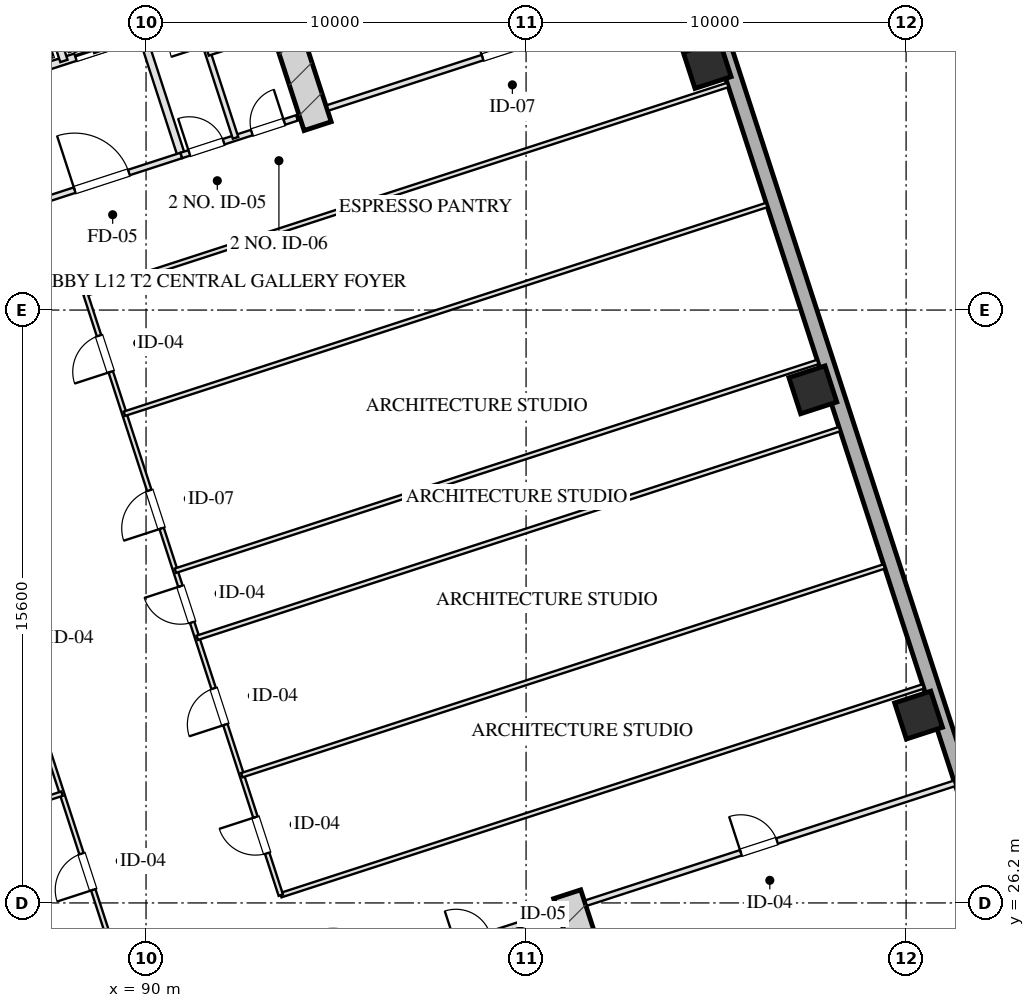
"""IFC4 building model, lengths in metres.
Left out: names, types, materials, properties, quantities, classifications, styles, units other than length and angle.
Written with IfcOpenShell. Run it as: python <this file> out.ifc"""

import sys

from ifc_helpers import new_model, si_unit, direction, frame, frame_2d, origin, origin_2d, place, context, subcontext, project, spatial, rectangle, hollow_rectangle, extrude, element, fill, save


model = new_model("IFC4")
c1 = context("Model", 3, precision=1e-05, world=origin(), true_north=direction((0.0, 1.0)))
c2 = subcontext(c1, "Body", "Model", "MODEL_VIEW")
j1 = project(units=[si_unit("LENGTHUNIT", "METRE"), si_unit("PLANEANGLEUNIT", "RADIAN")], contexts=[c1])
p1 = place(None, origin())
s1 = spatial("IfcSite", under=j1, at=p1, CompositionType="ELEMENT")
p2 = place(p1, origin())
s2 = spatial("IfcBuilding", under=s1, at=p2, CompositionType="ELEMENT")
p3 = place(p2, frame((0.0, 0.0, 54.05)))
s3 = spatial("IfcBuildingStorey", under=s2, at=p3, CompositionType="ELEMENT", Elevation=54.05)
for number, where, z_axis, x_axis in (
    (1, (101.082, 26.429, 0.0), (0.0, 0.0, 1.0), (0.309, -0.951, 0.0)),
    (2, (94.515, 46.639, 0.0), (0.0, 0.0, 1.0), (-0.309, 0.951, 0.0)),
):
    element("IfcWall", number, at=place(p3, frame(where, z_axis=z_axis, x_axis=x_axis)), inside=s3, PredefinedType="SHEAR", context=c2, shape_type="SweptSolid", body=[
        extrude(rectangle(XDim=9.63, YDim=0.75, at=frame_2d((4.815, 0.0))), origin(), (0.0, 0.0, 1.0), 3.45),
    ])
for number, where, z_axis, x_axis in (
    (3, (110.328, 31.142, 0.0), (0.0, 0.0, 1.0), (0.951, 0.309, 0.0)),
    (4, (107.547, 39.701, 0.0), (0.0, 0.0, 1.0), (0.951, 0.309, 0.0)),
    (5, (104.766, 48.261, 0.0), (0.0, 0.0, 1.0), (0.951, 0.309, 0.0)),
):
    element("IfcColumn", number, at=place(p3, frame(where, z_axis=z_axis, x_axis=x_axis)), inside=s3, PredefinedType="COLUMN", context=c2, shape_type="SweptSolid", body=[
        extrude(hollow_rectangle(XDim=1.0, YDim=1.0, WallThickness=0.036, at=origin_2d()), origin(), (0.0, 0.0, 1.0), 3.451),
    ])
p4 = place(p3, frame((100.345, 63.648, 0.0), z_axis=(0.0, 0.0, 1.0), x_axis=(0.309014526607, -0.951057318118, 0.0)))
e6 = element("IfcWall", 6, at=p4, inside=s3, PredefinedType="SOLIDWALL", context=c2, shape_type="SweptSolid", body=[
    extrude(rectangle(XDim=50.0, YDim=0.4, at=frame_2d((25.0, 0.0))), origin(), (0.0, 0.0, 1.0), 2.61),
])
p5 = place(p3, frame((97.727, 24.944, 0.0), z_axis=(0.0, 0.0, 1.0), x_axis=(0.951036872128, 0.309077446369, 0.0)))
e7 = element("IfcWall", 7, at=p5, inside=s3, PredefinedType="PARTITIONING", context=c2, shape_type="SweptSolid", body=[
    extrude(rectangle(XDim=3.2, YDim=0.15, at=frame_2d((1.6, 0.0))), origin(), (0.0, 0.0, 1.0), 3.175),
])
p6 = place(p5, frame((0.45, 0.0, 0.0)))
e8 = element("IfcOpeningElement", 8, at=p6, cuts=e7, PredefinedType="OPENING", context=c2, shape_type="SweptSolid", body=[
    extrude(rectangle(XDim=0.95, YDim=2.05, at=frame_2d((0.475, 1.025))), frame((0.0, 0.085, 0.0), z_axis=(0.0, -1.0, 0.0), x_axis=(1.0, 0.0, 0.0)), (0.0, 0.0, 1.0), 0.17),
])
p7 = place(p3, frame((90.928, 45.868, 0.0), z_axis=(0.0, 0.0, 1.0), x_axis=(-0.309042196757, 0.951048327176, 0.0)))
e9 = element("IfcWall", 9, at=p7, inside=s3, PredefinedType="PARTITIONING", context=c2, shape_type="SweptSolid", body=[
    extrude(rectangle(XDim=8.43, YDim=0.2, at=frame_2d((4.215, 0.0))), origin(), (0.0, 0.0, 1.0), 3.175),
])
p8 = place(p3, frame((86.743, 44.508, 0.0), z_axis=(0.0, 0.0, 1.0), x_axis=(0.951063829732, 0.308994485023, 0.0)))
e10 = element("IfcWall", 10, at=p8, inside=s3, PredefinedType="PARTITIONING", context=c2, shape_type="SweptSolid", body=[
    extrude(rectangle(XDim=4.4, YDim=0.15, at=frame_2d((2.2, 0.0))), origin(), (0.0, 0.0, 1.0), 3.175),
])
p9 = place(p8, frame((1.45, 0.0, 0.0)))
e11 = element("IfcOpeningElement", 11, at=p9, cuts=e10, PredefinedType="OPENING", context=c2, shape_type="SweptSolid", body=[
    extrude(rectangle(XDim=1.5, YDim=2.05, at=frame_2d((0.75, 1.025))), frame((0.0, 0.085, 0.0), z_axis=(0.0, -1.0, 0.0), x_axis=(1.0, 0.0, 0.0)), (0.0, 0.0, 1.0), 0.17),
])
p10 = place(p3, frame((85.718, 47.666, 0.0), z_axis=(0.0, 0.0, 1.0), x_axis=(0.951058531764, 0.30901079133, 0.0)))
e12 = element("IfcWall", 12, at=p10, inside=s3, PredefinedType="PARTITIONING", context=c2, shape_type="SweptSolid", body=[
    extrude(rectangle(XDim=4.4, YDim=0.2, at=frame_2d((2.2, 0.0))), origin(), (0.0, 0.0, 1.0), 3.175),
])
p11 = place(p10, frame((0.45, 0.0, 0.0)))
e13 = element("IfcOpeningElement", 13, at=p11, cuts=e12, PredefinedType="OPENING", context=c2, shape_type="SweptSolid", body=[
    extrude(rectangle(XDim=1.1, YDim=2.05, at=frame_2d((0.55, 1.025))), frame((0.0, 0.11, 0.0), z_axis=(0.0, -1.0, 0.0), x_axis=(1.0, 0.0, 0.0)), (0.0, 0.0, 1.0), 0.22),
])
p12 = place(p10, frame((2.55, 0.0, 0.0)))
e14 = element("IfcOpeningElement", 14, at=p12, cuts=e12, PredefinedType="OPENING", context=c2, shape_type="SweptSolid", body=[
    extrude(rectangle(XDim=1.1, YDim=2.05, at=frame_2d((0.55, 1.025))), frame((0.0, 0.11, 0.0), z_axis=(0.0, -1.0, 0.0), x_axis=(1.0, 0.0, 0.0)), (0.0, 0.0, 1.0), 0.22),
])
p13 = place(p3, frame((87.838, 48.354, 0.0), z_axis=(0.0, 0.0, 1.0), x_axis=(-0.3090093719, 0.951058992953, 0.0)))
e15 = element("IfcWall", 15, at=p13, inside=s3, PredefinedType="PARTITIONING", context=c2, shape_type="SweptSolid", body=[
    extrude(rectangle(XDim=5.11, YDim=0.2, at=frame_2d((2.555, 0.0))), origin(), (0.0, 0.0, 1.0), 3.175),
])
p14 = place(p3, frame((90.928, 45.868, 0.0), z_axis=(0.0, 0.0, 1.0), x_axis=(0.951059297078, 0.309008435874, 0.0)))
e16 = element("IfcWall", 16, at=p14, inside=s3, PredefinedType="PARTITIONING", context=c2, shape_type="SweptSolid", body=[
    extrude(rectangle(XDim=3.2, YDim=0.15, at=frame_2d((1.6, 0.0))), origin(), (0.0, 0.0, 1.0), 3.175),
])
p15 = place(p14, frame((0.22, 0.0, 0.0)))
e17 = element("IfcOpeningElement", 17, at=p15, cuts=e16, PredefinedType="OPENING", context=c2, shape_type="SweptSolid", body=[
    extrude(rectangle(XDim=0.95, YDim=2.05, at=frame_2d((0.475, 1.025))), frame((0.0, 0.085, 0.0), z_axis=(0.0, -1.0, 0.0), x_axis=(1.0, 0.0, 0.0)), (0.0, 0.0, 1.0), 0.17),
])
p16 = place(p14, frame((1.95, 0.0, 0.0)))
e18 = element("IfcOpeningElement", 18, at=p16, cuts=e16, PredefinedType="OPENING", context=c2, shape_type="SweptSolid", body=[
    extrude(rectangle(XDim=0.9, YDim=2.05, at=frame_2d((0.45, 1.025))), frame((0.0, 0.085, 0.0), z_axis=(0.0, -1.0, 0.0), x_axis=(1.0, 0.0, 0.0)), (0.0, 0.0, 1.0), 0.17),
])
p17 = place(p3, frame((92.355, 46.331, 0.0), z_axis=(0.0, 0.0, 1.0), x_axis=(-0.309007490203, 0.951059604335, 0.0)))
e19 = element("IfcWall", 19, at=p17, inside=s3, PredefinedType="PARTITIONING", context=c2, shape_type="SweptSolid", body=[
    extrude(rectangle(XDim=8.43, YDim=0.15, at=frame_2d((4.215, 0.0))), origin(), (0.0, 0.0, 1.0), 3.175),
])
p18 = place(p17, frame((2.55, 0.0, 0.0)))
e20 = element("IfcOpeningElement", 20, at=p18, cuts=e19, PredefinedType="OPENING", context=c2, shape_type="SweptSolid", body=[
    extrude(rectangle(XDim=0.95, YDim=2.05, at=frame_2d((0.475, 1.025))), frame((0.0, 0.085, 0.0), z_axis=(0.0, -1.0, 0.0), x_axis=(1.0, 0.0, 0.0)), (0.0, 0.0, 1.0), 0.17),
])
p19 = place(p17, frame((5.6, 0.0, 0.0)))
e21 = element("IfcOpeningElement", 21, at=p19, cuts=e19, PredefinedType="OPENING", context=c2, shape_type="SweptSolid", body=[
    extrude(rectangle(XDim=0.9, YDim=2.05, at=frame_2d((0.45, 1.025))), frame((0.0, 0.085, 0.0), z_axis=(0.0, -1.0, 0.0), x_axis=(1.0, 0.0, 0.0)), (0.0, 0.0, 1.0), 0.17),
])
p20 = place(p3, frame((91.628, 48.566, 0.0), z_axis=(0.0, 0.0, 1.0), x_axis=(0.951054116971, 0.309024378638, 0.0)))
e22 = element("IfcWall", 22, at=p20, inside=s3, PredefinedType="PARTITIONING", context=c2, shape_type="SweptSolid", body=[
    extrude(rectangle(XDim=1.7, YDim=0.15, at=frame_2d((0.85, 0.0))), origin(), (0.0, 0.0, 1.0), 3.175),
])
p21 = place(p3, frame((101.578, 26.196, 0.0), z_axis=(0.0, 0.0, 1.0), x_axis=(0.951059043131, 0.309009217467, 0.0)))
e23 = element("IfcWall", 23, at=p21, inside=s3, PredefinedType="PARTITIONING", context=c2, shape_type="SweptSolid", body=[
    extrude(rectangle(XDim=10.2, YDim=0.15, at=frame_2d((5.1, 0.0))), origin(), (0.0, 0.0, 1.0), 3.175),
])
p22 = place(p21, frame((4.284, 0.0, 0.0)))
e24 = element("IfcOpeningElement", 24, at=p22, cuts=e23, PredefinedType="OPENING", context=c2, shape_type="SweptSolid", body=[
    extrude(rectangle(XDim=1.0, YDim=2.05, at=frame_2d((0.5, 1.025))), frame((0.0, 0.085, 0.0), z_axis=(0.0, -1.0, 0.0), x_axis=(1.0, 0.0, 0.0)), (0.0, 0.0, 1.0), 0.17),
])
p23 = place(p3, frame((94.78, 47.119, 0.0), z_axis=(0.0, 0.0, 1.0), x_axis=(0.951054294345, 0.309023832749, 0.0)))
e25 = element("IfcWall", 25, at=p23, inside=s3, PredefinedType="PARTITIONING", context=c2, shape_type="SweptSolid", body=[
    extrude(rectangle(XDim=10.2, YDim=0.15, at=frame_2d((5.1, 0.0))), origin(), (0.0, 0.0, 1.0), 3.175),
])
p24 = place(p23, frame((4.284, 0.0, 0.0)))
e26 = element("IfcOpeningElement", 26, at=p24, cuts=e25, PredefinedType="OPENING", context=c2, shape_type="SweptSolid", body=[
    extrude(rectangle(XDim=1.05, YDim=2.05, at=frame_2d((0.525, 1.025))), frame((0.0, 0.085, 0.0), z_axis=(0.0, -1.0, 0.0), x_axis=(1.0, 0.0, 0.0)), (0.0, 0.0, 1.0), 0.17),
])
p25 = place(p3, frame((93.546, 26.404, 0.0), z_axis=(0.0, 0.0, 1.0), x_axis=(0.951058189574, 0.309011844505, 0.0)))
e27 = element("IfcWall", 27, at=p25, inside=s3, PredefinedType="PARTITIONING", context=c2, shape_type="SweptSolid", body=[
    extrude(rectangle(XDim=17.775, YDim=0.12, at=frame_2d((8.887, 0.0))), origin(), (0.0, 0.0, 1.0), 3.175),
])
p26 = place(p3, frame((88.404, 42.229, 0.0), z_axis=(0.0, 0.0, 1.0), x_axis=(0.951054152931, 0.309024267966, 0.0)))
e28 = element("IfcWall", 28, at=p26, inside=s3, PredefinedType="PARTITIONING", context=c2, shape_type="SweptSolid", body=[
    extrude(rectangle(XDim=17.775, YDim=0.12, at=frame_2d((8.888, 0.0))), origin(), (0.0, 0.0, 1.0), 3.175),
])
p27 = place(p3, frame((89.124, 24.967, 0.0), z_axis=(0.0, 0.0, 1.0), x_axis=(-0.30901773025, 0.951056277195, 0.0)))
e29 = element("IfcWall", 29, at=p27, inside=s3, PredefinedType="PARTITIONING", context=c2, shape_type="SweptSolid", body=[
    extrude(rectangle(XDim=16.64, YDim=0.12, at=frame_2d((8.32, 0.0))), origin(), (0.0, 0.0, 1.0), 3.175),
])
p28 = place(p27, frame((1.66, 0.0, 0.0)))
e30 = element("IfcOpeningElement", 30, at=p28, cuts=e29, PredefinedType="OPENING", context=c2, shape_type="SweptSolid", body=[
    extrude(rectangle(XDim=1.0, YDim=2.05, at=frame_2d((0.5, 1.025))), frame((0.0, 0.07, 0.0), z_axis=(0.0, -1.0, 0.0), x_axis=(1.0, 0.0, 0.0)), (0.0, 0.0, 1.0), 0.14),
])
p29 = place(p27, frame((7.82, 0.0, 0.0)))
e31 = element("IfcOpeningElement", 31, at=p29, cuts=e29, PredefinedType="OPENING", context=c2, shape_type="SweptSolid", body=[
    extrude(rectangle(XDim=1.0, YDim=2.05, at=frame_2d((0.5, 1.025))), frame((0.0, 0.07, 0.0), z_axis=(0.0, -1.0, 0.0), x_axis=(1.0, 0.0, 0.0)), (0.0, 0.0, 1.0), 0.14),
])
p30 = place(p27, frame((13.98, 0.0, 0.0)))
e32 = element("IfcOpeningElement", 32, at=p30, cuts=e29, PredefinedType="OPENING", context=c2, shape_type="SweptSolid", body=[
    extrude(rectangle(XDim=1.0, YDim=2.05, at=frame_2d((0.5, 1.025))), frame((0.0, 0.07, 0.0), z_axis=(0.0, -1.0, 0.0), x_axis=(1.0, 0.0, 0.0)), (0.0, 0.0, 1.0), 0.14),
])
p31 = place(p3, frame((93.546, 26.404, 0.0), z_axis=(0.0, 0.0, 1.0), x_axis=(-0.309022042254, 0.951054876125, 0.0)))
e33 = element("IfcWall", 33, at=p31, inside=s3, PredefinedType="PARTITIONING", context=c2, shape_type="SweptSolid", body=[
    extrude(rectangle(XDim=16.64, YDim=0.12, at=frame_2d((8.32, 0.0))), origin(), (0.0, 0.0, 1.0), 3.175),
])
p32 = place(p31, frame((1.16, 0.0, 0.0)))
e34 = element("IfcOpeningElement", 34, at=p32, cuts=e33, PredefinedType="OPENING", context=c2, shape_type="SweptSolid", body=[
    extrude(rectangle(XDim=1.0, YDim=2.05, at=frame_2d((0.5, 1.025))), frame((0.0, 0.07, 0.0), z_axis=(0.0, -1.0, 0.0), x_axis=(1.0, 0.0, 0.0)), (0.0, 0.0, 1.0), 0.14),
])
p33 = place(p31, frame((4.72, 0.0, 0.0)))
e35 = element("IfcOpeningElement", 35, at=p33, cuts=e33, PredefinedType="OPENING", context=c2, shape_type="SweptSolid", body=[
    extrude(rectangle(XDim=1.0, YDim=2.05, at=frame_2d((0.5, 1.025))), frame((0.0, 0.07, 0.0), z_axis=(0.0, -1.0, 0.0), x_axis=(1.0, 0.0, 0.0)), (0.0, 0.0, 1.0), 0.14),
])
p34 = place(p31, frame((7.549, 0.0, 0.0)))
e36 = element("IfcOpeningElement", 36, at=p34, cuts=e33, PredefinedType="OPENING", context=c2, shape_type="SweptSolid", body=[
    extrude(rectangle(XDim=1.0, YDim=2.05, at=frame_2d((0.5, 1.025))), frame((0.0, 0.07, 0.0), z_axis=(0.0, -1.0, 0.0), x_axis=(1.0, 0.0, 0.0)), (0.0, 0.0, 1.0), 0.14),
])
p35 = place(p31, frame((10.148, 0.0, 0.0)))
e37 = element("IfcOpeningElement", 37, at=p35, cuts=e33, PredefinedType="OPENING", context=c2, shape_type="SweptSolid", body=[
    extrude(rectangle(XDim=1.05, YDim=2.05, at=frame_2d((0.525, 1.025))), frame((0.0, 0.07, 0.0), z_axis=(0.0, -1.0, 0.0), x_axis=(1.0, 0.0, 0.0)), (0.0, 0.0, 1.0), 0.14),
])
p36 = place(p31, frame((14.48, 0.0, 0.0)))
e38 = element("IfcOpeningElement", 38, at=p36, cuts=e33, PredefinedType="OPENING", context=c2, shape_type="SweptSolid", body=[
    extrude(rectangle(XDim=1.0, YDim=2.05, at=frame_2d((0.5, 1.025))), frame((0.0, 0.07, 0.0), z_axis=(0.0, -1.0, 0.0), x_axis=(1.0, 0.0, 0.0)), (0.0, 0.0, 1.0), 0.14),
])
p37 = place(p3, frame((73.356, 24.386, 0.0), z_axis=(0.0, 0.0, 1.0), x_axis=(0.951054756643, 0.309022409974, 0.0)))
e39 = element("IfcWall", 39, at=p37, inside=s3, PredefinedType="PARTITIONING", context=c2, shape_type="SweptSolid", body=[
    extrude(rectangle(XDim=15.175, YDim=0.12, at=frame_2d((7.587, 0.0))), origin(), (0.0, 0.0, 1.0), 3.175),
])
for number, where, z_axis, x_axis in (
    (40, (92.52, 29.562, 0.0), (0.0, 0.0, 1.0), (0.951, 0.309, 0.0)),
    (41, (91.346, 33.176, 0.0), (0.0, 0.0, 1.0), (0.951, 0.309, 0.0)),
    (42, (90.772, 34.942, 0.0), (0.0, 0.0, 1.0), (0.951, 0.309, 0.0)),
    (43, (89.43, 39.072, 0.0), (0.0, 0.0, 1.0), (0.951, 0.309, 0.0)),
):
    element("IfcWall", number, at=place(p3, frame(where, z_axis=z_axis, x_axis=x_axis)), inside=s3, PredefinedType="PARTITIONING", context=c2, shape_type="SweptSolid", body=[
        extrude(rectangle(XDim=17.775, YDim=0.12, at=frame_2d((8.887, 0.0))), origin(), (0.0, 0.0, 1.0), 3.175),
    ])
p38 = place(p9, origin())
e44 = element("IfcDoor", 44, at=p38, inside=s3, OperationType="SINGLE_SWING_LEFT", PredefinedType="DOOR", context=c2, shape_type="SweptSolid", body=[
    extrude(rectangle(XDim=1.5, YDim=2.05, at=frame_2d((0.75, 1.025))), frame((0.0, 0.025, 0.0), z_axis=(0.0, -1.0, 0.0), x_axis=(1.0, 0.0, 0.0)), (0.0, 0.0, 1.0), 0.05),
])
fill(e11, e44)
p39 = place(p12, origin())
e45 = element("IfcDoor", 45, at=p39, inside=s3, OperationType="DOUBLE_DOOR_SLIDING", PredefinedType="DOOR", context=c2, shape_type="SweptSolid", body=[
    extrude(rectangle(XDim=1.1, YDim=2.05, at=frame_2d((0.55, 1.025))), frame((0.0, 0.025, 0.0), z_axis=(0.0, -1.0, 0.0), x_axis=(1.0, 0.0, 0.0)), (0.0, 0.0, 1.0), 0.05),
])
fill(e14, e45)
p40 = place(p15, origin())
e46 = element("IfcDoor", 46, at=p40, inside=s3, OperationType="SINGLE_SWING_LEFT", PredefinedType="DOOR", context=c2, shape_type="SweptSolid", body=[
    extrude(rectangle(XDim=0.95, YDim=2.05, at=frame_2d((0.475, 1.025))), frame((0.0, 0.025, 0.0), z_axis=(0.0, -1.0, 0.0), x_axis=(1.0, 0.0, 0.0)), (0.0, 0.0, 1.0), 0.05),
])
fill(e17, e46)
p41 = place(p16, origin())
e47 = element("IfcDoor", 47, at=p41, inside=s3, OperationType="SINGLE_SWING_RIGHT", PredefinedType="DOOR", context=c2, shape_type="SweptSolid", body=[
    extrude(rectangle(XDim=0.9, YDim=2.05, at=frame_2d((0.45, 1.025))), frame((0.0, 0.025, 0.0), z_axis=(0.0, -1.0, 0.0), x_axis=(1.0, 0.0, 0.0)), (0.0, 0.0, 1.0), 0.05),
])
fill(e18, e47)
p42 = place(p22, origin())
e48 = element("IfcDoor", 48, at=p42, inside=s3, OperationType="SINGLE_SWING_LEFT", PredefinedType="DOOR", context=c2, shape_type="SweptSolid", body=[
    extrude(rectangle(XDim=1.0, YDim=2.05, at=frame_2d((0.5, 1.025))), frame((0.0, 0.025, 0.0), z_axis=(0.0, -1.0, 0.0), x_axis=(1.0, 0.0, 0.0)), (0.0, 0.0, 1.0), 0.05),
])
fill(e24, e48)
p43 = place(p24, origin())
e49 = element("IfcDoor", 49, at=p43, inside=s3, OperationType="SINGLE_SWING_LEFT", PredefinedType="DOOR", context=c2, shape_type="SweptSolid", body=[
    extrude(rectangle(XDim=1.05, YDim=2.05, at=frame_2d((0.525, 1.025))), frame((0.0, 0.025, 0.0), z_axis=(0.0, -1.0, 0.0), x_axis=(1.0, 0.0, 0.0)), (0.0, 0.0, 1.0), 0.05),
])
fill(e26, e49)
p44 = place(p28, origin())
e50 = element("IfcDoor", 50, at=p44, inside=s3, OperationType="SINGLE_SWING_LEFT", PredefinedType="DOOR", context=c2, shape_type="SweptSolid", body=[
    extrude(rectangle(XDim=1.0, YDim=2.05, at=frame_2d((0.5, 1.025))), frame((0.0, 0.025, 0.0), z_axis=(0.0, -1.0, 0.0), x_axis=(1.0, 0.0, 0.0)), (0.0, 0.0, 1.0), 0.05),
])
fill(e30, e50)
p45 = place(p32, origin())
e51 = element("IfcDoor", 51, at=p45, inside=s3, OperationType="SINGLE_SWING_RIGHT", PredefinedType="DOOR", context=c2, shape_type="SweptSolid", body=[
    extrude(rectangle(XDim=1.0, YDim=2.05, at=frame_2d((0.5, 1.025))), frame((0.0, 0.025, 0.0), z_axis=(0.0, -1.0, 0.0), x_axis=(1.0, 0.0, 0.0)), (0.0, 0.0, 1.0), 0.05),
])
fill(e34, e51)
p46 = place(p33, origin())
e52 = element("IfcDoor", 52, at=p46, inside=s3, OperationType="SINGLE_SWING_LEFT", PredefinedType="DOOR", context=c2, shape_type="SweptSolid", body=[
    extrude(rectangle(XDim=1.0, YDim=2.05, at=frame_2d((0.5, 1.025))), frame((0.0, 0.025, 0.0), z_axis=(0.0, -1.0, 0.0), x_axis=(1.0, 0.0, 0.0)), (0.0, 0.0, 1.0), 0.05),
])
fill(e35, e52)
p47 = place(p34, origin())
e53 = element("IfcDoor", 53, at=p47, inside=s3, OperationType="SINGLE_SWING_RIGHT", PredefinedType="DOOR", context=c2, shape_type="SweptSolid", body=[
    extrude(rectangle(XDim=1.0, YDim=2.05, at=frame_2d((0.5, 1.025))), frame((0.0, 0.025, 0.0), z_axis=(0.0, -1.0, 0.0), x_axis=(1.0, 0.0, 0.0)), (0.0, 0.0, 1.0), 0.05),
])
fill(e36, e53)
p48 = place(p35, origin())
e54 = element("IfcDoor", 54, at=p48, inside=s3, OperationType="SINGLE_SWING_LEFT", PredefinedType="DOOR", context=c2, shape_type="SweptSolid", body=[
    extrude(rectangle(XDim=1.05, YDim=2.05, at=frame_2d((0.525, 1.025))), frame((0.0, 0.025, 0.0), z_axis=(0.0, -1.0, 0.0), x_axis=(1.0, 0.0, 0.0)), (0.0, 0.0, 1.0), 0.05),
])
fill(e37, e54)
p49 = place(p36, origin())
e55 = element("IfcDoor", 55, at=p49, inside=s3, OperationType="SINGLE_SWING_LEFT", PredefinedType="DOOR", context=c2, shape_type="SweptSolid", body=[
    extrude(rectangle(XDim=1.0, YDim=2.05, at=frame_2d((0.5, 1.025))), frame((0.0, 0.025, 0.0), z_axis=(0.0, -1.0, 0.0), x_axis=(1.0, 0.0, 0.0)), (0.0, 0.0, 1.0), 0.05),
])
fill(e38, e55)
save(model, sys.argv[1])
